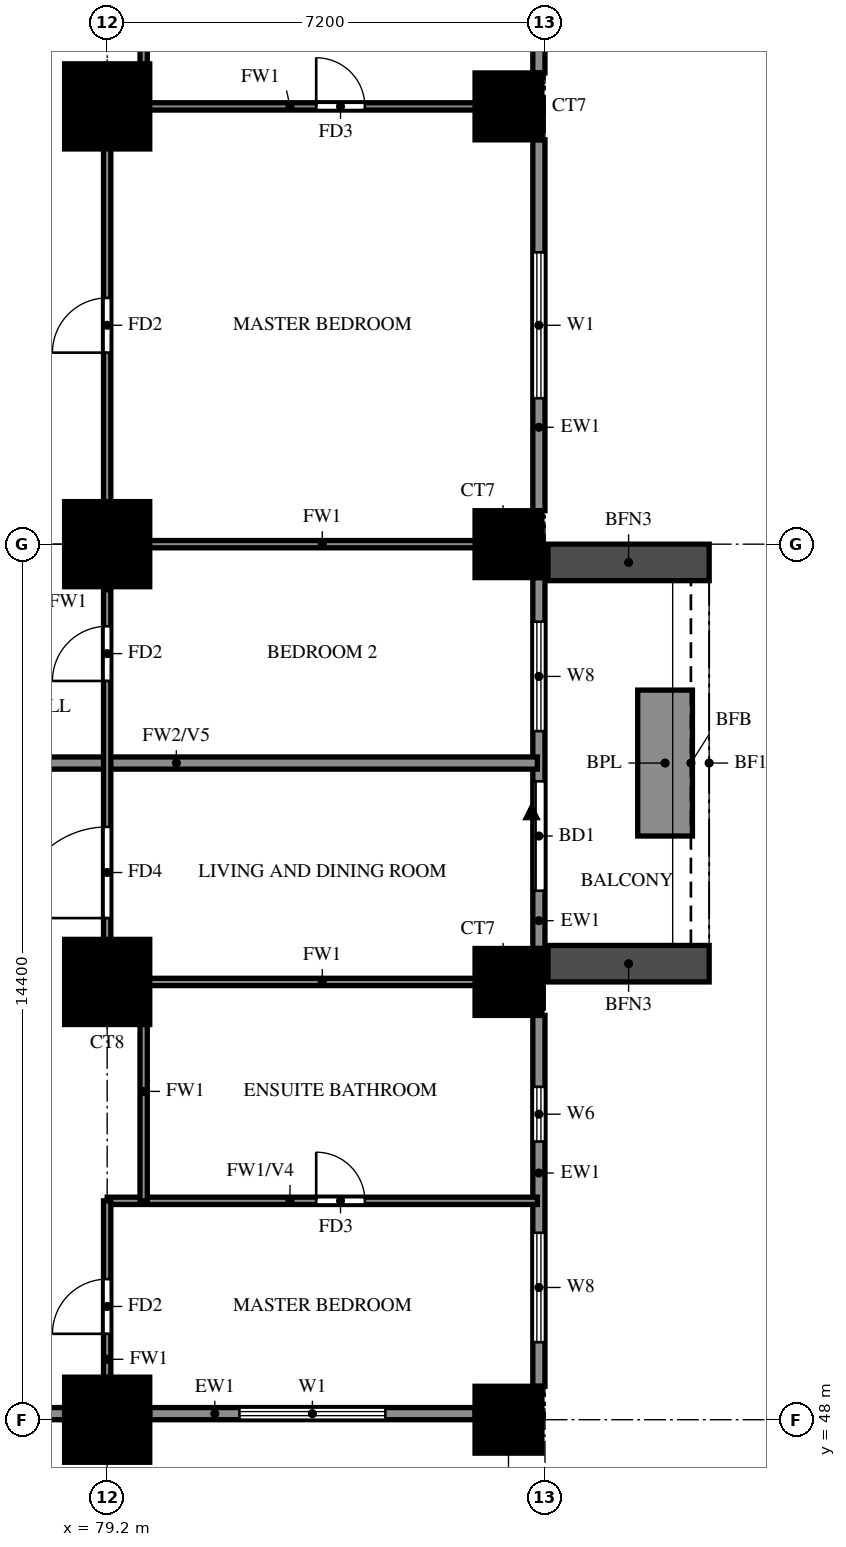
"""IFC4 building model, lengths in metres.
Left out: names, types, materials, properties, quantities, classifications, styles, units other than length and angle.
Written with IfcOpenShell. Run it as: python <this file> out.ifc"""

import sys

from ifc_helpers import new_model, si_unit, direction, frame, frame_2d, origin, origin_2d, place, context, subcontext, project, spatial, rectangle, extrude, source, transform, mapped, element, fill, save


model = new_model("IFC4")
c1 = context("Model", 3, precision=1e-05, world=origin(), true_north=direction((0.0, 1.0)))
c2 = subcontext(c1, "Body", "Model", "MODEL_VIEW")
j1 = project(units=[si_unit("LENGTHUNIT", "METRE"), si_unit("PLANEANGLEUNIT", "RADIAN")], contexts=[c1])
p1 = place(None, origin())
s1 = spatial("IfcSite", under=j1, at=p1, CompositionType="ELEMENT")
p2 = place(p1, origin())
s2 = spatial("IfcBuilding", under=s1, at=p2, CompositionType="ELEMENT")
p3 = place(p2, frame((0.0, 0.0, 51.5)))
s3 = spatial("IfcBuildingStorey", under=s2, at=p3, CompositionType="ELEMENT", Elevation=51.5)
m1 = source(origin(), c2, "Body", "SweptSolid", [
    extrude(rectangle(XDim=1.4, YDim=1.4, at=origin_2d()), origin(), (0.0, 0.0, 1.0), 3.18),
])
p4 = place(p3, frame((79.2, 48.0, 0.0), z_axis=(0.0, 0.0, 1.0), x_axis=(1.0, 0.0, 0.0)))
e1 = element("IfcColumn", 1, at=p4, inside=s3, PredefinedType="COLUMN", context=c2, shape_type="MappedRepresentation", body=[
    mapped(m1, transform((0.0, 0.0, 0.0))),
])
m2 = source(origin(), c2, "Body", "SweptSolid", [
    extrude(rectangle(XDim=1.1, YDim=1.1, at=origin_2d()), origin(), (0.0, 0.0, 1.0), 3.18),
])
p5 = place(p3, frame((85.8, 48.0, 0.0), z_axis=(0.0, 0.0, 1.0), x_axis=(1.0, 0.0, 0.0)))
e2 = element("IfcColumn", 2, at=p5, inside=s3, PredefinedType="COLUMN", context=c2, shape_type="MappedRepresentation", body=[
    mapped(m2, transform((0.0, 0.0, 0.0))),
])
p6 = place(p3, frame((79.2, 55.2, 0.0), z_axis=(0.0, 0.0, 1.0), x_axis=(1.0, 0.0, 0.0)))
e3 = element("IfcColumn", 3, at=p6, inside=s3, PredefinedType="COLUMN", context=c2, shape_type="MappedRepresentation", body=[
    mapped(m1, transform((0.0, 0.0, 0.0))),
])
p7 = place(p3, frame((85.8, 55.2, 0.0), z_axis=(0.0, 0.0, 1.0), x_axis=(1.0, 0.0, 0.0)))
e4 = element("IfcColumn", 4, at=p7, inside=s3, PredefinedType="COLUMN", context=c2, shape_type="MappedRepresentation", body=[
    mapped(m2, transform((0.0, 0.0, 0.0))),
])
p8 = place(p3, frame((79.2, 62.4, 0.0), z_axis=(0.0, 0.0, 1.0), x_axis=(1.0, 0.0, 0.0)))
e5 = element("IfcColumn", 5, at=p8, inside=s3, PredefinedType="COLUMN", context=c2, shape_type="MappedRepresentation", body=[
    mapped(m1, transform((0.0, 0.0, 0.0))),
])
p9 = place(p3, frame((85.8, 62.4, 0.0), z_axis=(0.0, 0.0, 1.0), x_axis=(1.0, 0.0, 0.0)))
e6 = element("IfcColumn", 6, at=p9, inside=s3, PredefinedType="COLUMN", context=c2, shape_type="MappedRepresentation", body=[
    mapped(m2, transform((0.0, 0.0, 0.0))),
])
p10 = place(p3, frame((79.2, 69.6, 0.0), z_axis=(0.0, 0.0, 1.0), x_axis=(1.0, 0.0, 0.0)))
e7 = element("IfcColumn", 7, at=p10, inside=s3, PredefinedType="COLUMN", context=c2, shape_type="MappedRepresentation", body=[
    mapped(m1, transform((0.0, 0.0, 0.0))),
])
p11 = place(p3, frame((85.8, 69.6, 0.0), z_axis=(0.0, 0.0, 1.0), x_axis=(1.0, 0.0, 0.0)))
e8 = element("IfcColumn", 8, at=p11, inside=s3, PredefinedType="COLUMN", context=c2, shape_type="MappedRepresentation", body=[
    mapped(m2, transform((0.0, 0.0, 0.0))),
])
p12 = place(p3, frame((78.74, 41.118, 0.0), z_axis=(0.0, 0.0, 1.0), x_axis=(-0.707106781187, 0.707106781187, 0.0)))
e9 = element("IfcWall", 9, at=p12, inside=s3, PredefinedType="SOLIDWALL", context=c2, shape_type="SweptSolid", body=[
    extrude(rectangle(XDim=9.874, YDim=0.2, at=frame_2d((4.937, 0.0))), origin(), (0.0, 0.0, 1.0), 3.18),
])
p13 = place(p12, frame((2.264, 0.0, 0.6)))
e10 = element("IfcOpeningElement", 10, at=p13, cuts=e9, PredefinedType="OPENING", context=c2, shape_type="SweptSolid", body=[
    extrude(rectangle(XDim=2.4, YDim=2.4, at=frame_2d((1.2, 1.2))), frame((0.0, 0.11, 0.0), z_axis=(0.0, -1.0, 0.0), x_axis=(1.0, 0.0, 0.0)), (0.0, 0.0, 1.0), 0.22),
])
p14 = place(p12, frame((5.836, 0.0, 0.6)))
e11 = element("IfcOpeningElement", 11, at=p14, cuts=e9, PredefinedType="OPENING", context=c2, shape_type="SweptSolid", body=[
    extrude(rectangle(XDim=2.4, YDim=2.4, at=frame_2d((1.2, 1.2))), frame((0.0, 0.11, 0.0), z_axis=(0.0, -1.0, 0.0), x_axis=(1.0, 0.0, 0.0)), (0.0, 0.0, 1.0), 0.22),
])
p15 = place(p3, frame((71.989, 48.1, 0.0), z_axis=(0.0, 0.0, 1.0), x_axis=(1.0, 0.0, 0.0)))
e12 = element("IfcWall", 12, at=p15, inside=s3, PredefinedType="SOLIDWALL", context=c2, shape_type="SweptSolid", body=[
    extrude(rectangle(XDim=6.511, YDim=0.2, at=frame_2d((3.256, 0.0))), origin(), (0.0, 0.0, 1.0), 3.18),
])
p16 = place(p15, frame((2.206, 0.0, 1.5)))
e13 = element("IfcOpeningElement", 13, at=p16, cuts=e12, PredefinedType="OPENING", context=c2, shape_type="SweptSolid", body=[
    extrude(rectangle(XDim=0.9, YDim=0.9, at=frame_2d((0.45, 0.45))), frame((0.0, 0.11, 0.0), z_axis=(0.0, -1.0, 0.0), x_axis=(1.0, 0.0, 0.0)), (0.0, 0.0, 1.0), 0.22),
])
p17 = place(p3, frame((79.9, 48.1, 0.0), z_axis=(0.0, 0.0, 1.0), x_axis=(1.0, 0.0, 0.0)))
e14 = element("IfcWall", 14, at=p17, inside=s3, PredefinedType="SOLIDWALL", context=c2, shape_type="SweptSolid", body=[
    extrude(rectangle(XDim=5.35, YDim=0.2, at=frame_2d((2.675, 0.0))), origin(), (0.0, 0.0, 1.0), 3.18),
])
p18 = place(p17, frame((1.475, 0.0, 0.6)))
e15 = element("IfcOpeningElement", 15, at=p18, cuts=e14, PredefinedType="OPENING", context=c2, shape_type="SweptSolid", body=[
    extrude(rectangle(XDim=2.4, YDim=2.4, at=frame_2d((1.2, 1.2))), frame((0.0, 0.11, 0.0), z_axis=(0.0, -1.0, 0.0), x_axis=(1.0, 0.0, 0.0)), (0.0, 0.0, 1.0), 0.22),
])
p19 = place(p3, frame((86.3, 48.55, 0.0), z_axis=(0.0, 0.0, 1.0), x_axis=(0.0, 1.0, 0.0)))
e16 = element("IfcWall", 16, at=p19, inside=s3, PredefinedType="SOLIDWALL", context=c2, shape_type="SweptSolid", body=[
    extrude(rectangle(XDim=6.1, YDim=0.2, at=frame_2d((3.05, 0.0))), origin(), (0.0, 0.0, 1.0), 3.18),
])
p20 = place(p19, frame((0.725, 0.0, 0.6)))
e17 = element("IfcOpeningElement", 17, at=p20, cuts=e16, PredefinedType="OPENING", context=c2, shape_type="SweptSolid", body=[
    extrude(rectangle(XDim=1.8, YDim=2.4, at=frame_2d((0.9, 1.2))), frame((0.0, 0.11, 0.0), z_axis=(0.0, -1.0, 0.0), x_axis=(1.0, 0.0, 0.0)), (0.0, 0.0, 1.0), 0.22),
])
p21 = place(p19, frame((4.025, 0.0, 1.5)))
e18 = element("IfcOpeningElement", 18, at=p21, cuts=e16, PredefinedType="OPENING", context=c2, shape_type="SweptSolid", body=[
    extrude(rectangle(XDim=0.9, YDim=0.9, at=frame_2d((0.45, 0.45))), frame((0.0, 0.11, 0.0), z_axis=(0.0, -1.0, 0.0), x_axis=(1.0, 0.0, 0.0)), (0.0, 0.0, 1.0), 0.22),
])
p22 = place(p3, frame((86.3, 55.75, 0.0), z_axis=(0.0, 0.0, 1.0), x_axis=(0.0, 1.0, 0.0)))
e19 = element("IfcWall", 19, at=p22, inside=s3, PredefinedType="SOLIDWALL", context=c2, shape_type="SweptSolid", body=[
    extrude(rectangle(XDim=6.1, YDim=0.2, at=frame_2d((3.05, 0.0))), origin(), (0.0, 0.0, 1.0), 3.18),
])
p23 = place(p22, frame((0.95, 0.0, 0.0)))
e20 = element("IfcOpeningElement", 20, at=p23, cuts=e19, PredefinedType="OPENING", context=c2, shape_type="SweptSolid", body=[
    extrude(rectangle(XDim=1.8, YDim=2.4, at=frame_2d((0.9, 1.2))), frame((0.0, 0.11, 0.0), z_axis=(0.0, -1.0, 0.0), x_axis=(1.0, 0.0, 0.0)), (0.0, 0.0, 1.0), 0.22),
])
p24 = place(p22, frame((3.575, 0.0, 0.6)))
e21 = element("IfcOpeningElement", 21, at=p24, cuts=e19, PredefinedType="OPENING", context=c2, shape_type="SweptSolid", body=[
    extrude(rectangle(XDim=1.8, YDim=2.4, at=frame_2d((0.9, 1.2))), frame((0.0, 0.11, 0.0), z_axis=(0.0, -1.0, 0.0), x_axis=(1.0, 0.0, 0.0)), (0.0, 0.0, 1.0), 0.22),
])
p25 = place(p3, frame((86.3, 62.95, 0.0), z_axis=(0.0, 0.0, 1.0), x_axis=(0.0, 1.0, 0.0)))
e22 = element("IfcWall", 22, at=p25, inside=s3, PredefinedType="SOLIDWALL", context=c2, shape_type="SweptSolid", body=[
    extrude(rectangle(XDim=6.1, YDim=0.2, at=frame_2d((3.05, 0.0))), origin(), (0.0, 0.0, 1.0), 3.18),
])
p26 = place(p25, frame((1.85, 0.0, 0.6)))
e23 = element("IfcOpeningElement", 23, at=p26, cuts=e22, PredefinedType="OPENING", context=c2, shape_type="SweptSolid", body=[
    extrude(rectangle(XDim=2.4, YDim=2.4, at=frame_2d((1.2, 1.2))), frame((0.0, 0.11, 0.0), z_axis=(0.0, -1.0, 0.0), x_axis=(1.0, 0.0, 0.0)), (0.0, 0.0, 1.0), 0.22),
])
p27 = place(p3, frame((86.3, 70.15, 0.0), z_axis=(0.0, 0.0, 1.0), x_axis=(0.0, 1.0, 0.0)))
e24 = element("IfcWall", 24, at=p27, inside=s3, PredefinedType="SOLIDWALL", context=c2, shape_type="SweptSolid", body=[
    extrude(rectangle(XDim=6.1, YDim=0.2, at=frame_2d((3.05, 0.0))), origin(), (0.0, 0.0, 1.0), 3.18),
])
p28 = place(p27, frame((1.175, 0.0, 1.5)))
e25 = element("IfcOpeningElement", 25, at=p28, cuts=e24, PredefinedType="OPENING", context=c2, shape_type="SweptSolid", body=[
    extrude(rectangle(XDim=0.9, YDim=0.9, at=frame_2d((0.45, 0.45))), frame((0.0, 0.11, 0.0), z_axis=(0.0, -1.0, 0.0), x_axis=(1.0, 0.0, 0.0)), (0.0, 0.0, 1.0), 0.22),
])
p29 = place(p27, frame((3.575, 0.0, 0.6)))
e26 = element("IfcOpeningElement", 26, at=p29, cuts=e24, PredefinedType="OPENING", context=c2, shape_type="SweptSolid", body=[
    extrude(rectangle(XDim=1.8, YDim=2.4, at=frame_2d((0.9, 1.2))), frame((0.0, 0.11, 0.0), z_axis=(0.0, -1.0, 0.0), x_axis=(1.0, 0.0, 0.0)), (0.0, 0.0, 1.0), 0.22),
])
for number, where, z_axis, x_axis in (
    (27, (86.45, 55.5, 0.0), (0.0, 0.0, 1.0), (1.0, 0.0, 0.0)),
    (28, (86.45, 62.1, 0.0), (0.0, 0.0, 1.0), (1.0, 0.0, 0.0)),
):
    element("IfcWall", number, at=place(p3, frame(where, z_axis=z_axis, x_axis=x_axis)), inside=s3, PredefinedType="SOLIDWALL", context=c2, shape_type="SweptSolid", body=[
        extrude(rectangle(XDim=2.65, YDim=0.6, at=frame_2d((1.325, 0.0))), origin(), (0.0, 0.0, 1.0), 2.85),
    ])
p30 = place(p3, frame((88.375, 57.6, 0.0), z_axis=(0.0, 0.0, 1.0), x_axis=(0.0, 1.0, 0.0)))
e29 = element("IfcWall", 29, at=p30, inside=s3, PredefinedType="SOLIDWALL", context=c2, shape_type="SweptSolid", body=[
    extrude(rectangle(XDim=2.4, YDim=0.9, at=frame_2d((1.2, 0.0))), origin(), (0.0, 0.0, 1.0), 0.9),
])
p31 = place(p3, frame((74.4, 58.8, 0.0), z_axis=(0.0, 0.0, 1.0), x_axis=(1.0, 0.0, 0.0)))
e30 = element("IfcWall", 30, at=p31, inside=s3, PredefinedType="SOLIDWALL", context=c2, shape_type="SweptSolid", body=[
    extrude(rectangle(XDim=11.875, YDim=0.2, at=frame_2d((5.938, 0.0))), origin(), (0.0, 0.0, 1.0), 2.28),
])
p32 = place(p3, frame((79.2, 51.6, 0.0), z_axis=(0.0, 0.0, 1.0), x_axis=(1.0, 0.0, 0.0)))
e31 = element("IfcWall", 31, at=p32, inside=s3, PredefinedType="PARTITIONING", context=c2, shape_type="SweptSolid", body=[
    extrude(rectangle(XDim=7.075, YDim=0.12, at=frame_2d((3.538, 0.0))), origin(), (0.0, 0.0, 1.0), 2.28),
])
p33 = place(p32, frame((3.438, 0.0, 0.0)))
e32 = element("IfcOpeningElement", 32, at=p33, cuts=e31, PredefinedType="OPENING", context=c2, shape_type="SweptSolid", body=[
    extrude(rectangle(XDim=0.8, YDim=2.1, at=frame_2d((0.4, 1.05))), frame((0.0, 0.07, 0.0), z_axis=(0.0, -1.0, 0.0), x_axis=(1.0, 0.0, 0.0)), (0.0, 0.0, 1.0), 0.14),
])
for number, where, z_axis, x_axis in (
    (33, (79.2, 55.2, 0.0), (0.0, 0.0, 1.0), (1.0, 0.0, 0.0)),
    (34, (79.2, 62.4, 0.0), (0.0, 0.0, 1.0), (1.0, 0.0, 0.0)),
):
    element("IfcWall", number, at=place(p3, frame(where, z_axis=z_axis, x_axis=x_axis)), inside=s3, PredefinedType="PARTITIONING", context=c2, shape_type="SweptSolid", body=[
        extrude(rectangle(XDim=7.075, YDim=0.12, at=frame_2d((3.538, 0.0))), origin(), (0.0, 0.0, 1.0), 3.18),
    ])
p34 = place(p3, frame((79.2, 69.6, 0.0), z_axis=(0.0, 0.0, 1.0), x_axis=(1.0, 0.0, 0.0)))
e35 = element("IfcWall", 35, at=p34, inside=s3, PredefinedType="PARTITIONING", context=c2, shape_type="SweptSolid", body=[
    extrude(rectangle(XDim=7.075, YDim=0.12, at=frame_2d((3.538, 0.0))), origin(), (0.0, 0.0, 1.0), 3.18),
])
p35 = place(p34, frame((3.438, 0.0, 0.0)))
e36 = element("IfcOpeningElement", 36, at=p35, cuts=e35, PredefinedType="OPENING", context=c2, shape_type="SweptSolid", body=[
    extrude(rectangle(XDim=0.8, YDim=2.1, at=frame_2d((0.4, 1.05))), frame((0.0, 0.07, 0.0), z_axis=(0.0, -1.0, 0.0), x_axis=(1.0, 0.0, 0.0)), (0.0, 0.0, 1.0), 0.14),
])
p36 = place(p3, frame((79.2, 48.125, 0.0), z_axis=(0.0, 0.0, 1.0), x_axis=(0.0, 1.0, 0.0)))
e37 = element("IfcWall", 37, at=p36, inside=s3, PredefinedType="PARTITIONING", context=c2, shape_type="SweptSolid", body=[
    extrude(rectangle(XDim=3.475, YDim=0.12, at=frame_2d((1.738, 0.0))), origin(), (0.0, 0.0, 1.0), 3.18),
])
p37 = place(p36, frame((1.288, 0.0, 0.0)))
e38 = element("IfcOpeningElement", 38, at=p37, cuts=e37, PredefinedType="OPENING", context=c2, shape_type="SweptSolid", body=[
    extrude(rectangle(XDim=0.9, YDim=2.1, at=frame_2d((0.45, 1.05))), frame((0.0, 0.07, 0.0), z_axis=(0.0, -1.0, 0.0), x_axis=(1.0, 0.0, 0.0)), (0.0, 0.0, 1.0), 0.14),
])
p38 = place(p3, frame((79.2, 55.2, 0.0), z_axis=(0.0, 0.0, 1.0), x_axis=(0.0, 1.0, 0.0)))
e39 = element("IfcWall", 39, at=p38, inside=s3, PredefinedType="PARTITIONING", context=c2, shape_type="SweptSolid", body=[
    extrude(rectangle(XDim=14.4, YDim=0.12, at=frame_2d((7.2, 0.0))), origin(), (0.0, 0.0, 1.0), 3.18),
])
p39 = place(p38, frame((1.05, 0.0, 0.0)))
e40 = element("IfcOpeningElement", 40, at=p39, cuts=e39, PredefinedType="OPENING", context=c2, shape_type="SweptSolid", body=[
    extrude(rectangle(XDim=1.5, YDim=2.1, at=frame_2d((0.75, 1.05))), frame((0.0, 0.07, 0.0), z_axis=(0.0, -1.0, 0.0), x_axis=(1.0, 0.0, 0.0)), (0.0, 0.0, 1.0), 0.14),
])
p40 = place(p38, frame((4.95, 0.0, 0.0)))
e41 = element("IfcOpeningElement", 41, at=p40, cuts=e39, PredefinedType="OPENING", context=c2, shape_type="SweptSolid", body=[
    extrude(rectangle(XDim=0.9, YDim=2.1, at=frame_2d((0.45, 1.05))), frame((0.0, 0.07, 0.0), z_axis=(0.0, -1.0, 0.0), x_axis=(1.0, 0.0, 0.0)), (0.0, 0.0, 1.0), 0.14),
])
p41 = place(p38, frame((10.35, 0.0, 0.0)))
e42 = element("IfcOpeningElement", 42, at=p41, cuts=e39, PredefinedType="OPENING", context=c2, shape_type="SweptSolid", body=[
    extrude(rectangle(XDim=0.9, YDim=2.1, at=frame_2d((0.45, 1.05))), frame((0.0, 0.07, 0.0), z_axis=(0.0, -1.0, 0.0), x_axis=(1.0, 0.0, 0.0)), (0.0, 0.0, 1.0), 0.14),
])
for number, where, z_axis, x_axis in (
    (43, (79.8, 51.6, 0.0), (0.0, 0.0, 1.0), (0.0, 1.0, 0.0)),
    (44, (79.8, 69.6, 0.0), (0.0, 0.0, 1.0), (0.0, 1.0, 0.0)),
):
    element("IfcWall", number, at=place(p3, frame(where, z_axis=z_axis, x_axis=x_axis)), inside=s3, PredefinedType="PARTITIONING", context=c2, shape_type="SweptSolid", body=[
        extrude(rectangle(XDim=3.6, YDim=0.12, at=frame_2d((1.8, 0.0))), origin(), (0.0, 0.0, 1.0), 3.18),
    ])
p42 = place(p18, origin())
e45 = element("IfcWindow", 45, at=p42, inside=s3, PartitioningType="DOUBLE_PANEL_VERTICAL", PredefinedType="WINDOW", context=c2, shape_type="SweptSolid", body=[
    extrude(rectangle(XDim=2.4, YDim=2.4, at=frame_2d((1.2, 1.2))), frame((0.0, 0.03, 0.0), z_axis=(0.0, -1.0, 0.0), x_axis=(1.0, 0.0, 0.0)), (0.0, 0.0, 1.0), 0.06),
])
fill(e15, e45)
p43 = place(p20, origin())
e46 = element("IfcWindow", 46, at=p43, inside=s3, PartitioningType="DOUBLE_PANEL_VERTICAL", PredefinedType="WINDOW", context=c2, shape_type="SweptSolid", body=[
    extrude(rectangle(XDim=1.8, YDim=2.4, at=frame_2d((0.9, 1.2))), frame((0.0, 0.03, 0.0), z_axis=(0.0, -1.0, 0.0), x_axis=(1.0, 0.0, 0.0)), (0.0, 0.0, 1.0), 0.06),
])
fill(e17, e46)
p44 = place(p21, origin())
e47 = element("IfcWindow", 47, at=p44, inside=s3, PartitioningType="SINGLE_PANEL", PredefinedType="WINDOW", context=c2, shape_type="SweptSolid", body=[
    extrude(rectangle(XDim=0.9, YDim=0.9, at=frame_2d((0.45, 0.45))), frame((0.0, 0.03, 0.0), z_axis=(0.0, -1.0, 0.0), x_axis=(1.0, 0.0, 0.0)), (0.0, 0.0, 1.0), 0.06),
])
fill(e18, e47)
p45 = place(p23, origin())
e48 = element("IfcDoor", 48, at=p45, inside=s3, OperationType="DOUBLE_DOOR_SLIDING", PredefinedType="DOOR", context=c2, shape_type="SweptSolid", body=[
    extrude(rectangle(XDim=1.8, YDim=2.4, at=frame_2d((0.9, 1.2))), frame((0.0, 0.025, 0.0), z_axis=(0.0, -1.0, 0.0), x_axis=(1.0, 0.0, 0.0)), (0.0, 0.0, 1.0), 0.05),
])
fill(e20, e48)
p46 = place(p24, origin())
e49 = element("IfcWindow", 49, at=p46, inside=s3, PartitioningType="DOUBLE_PANEL_VERTICAL", PredefinedType="WINDOW", context=c2, shape_type="SweptSolid", body=[
    extrude(rectangle(XDim=1.8, YDim=2.4, at=frame_2d((0.9, 1.2))), frame((0.0, 0.03, 0.0), z_axis=(0.0, -1.0, 0.0), x_axis=(1.0, 0.0, 0.0)), (0.0, 0.0, 1.0), 0.06),
])
fill(e21, e49)
p47 = place(p26, origin())
e50 = element("IfcWindow", 50, at=p47, inside=s3, PartitioningType="DOUBLE_PANEL_VERTICAL", PredefinedType="WINDOW", context=c2, shape_type="SweptSolid", body=[
    extrude(rectangle(XDim=2.4, YDim=2.4, at=frame_2d((1.2, 1.2))), frame((0.0, 0.03, 0.0), z_axis=(0.0, -1.0, 0.0), x_axis=(1.0, 0.0, 0.0)), (0.0, 0.0, 1.0), 0.06),
])
fill(e23, e50)
p48 = place(p37, origin())
e51 = element("IfcDoor", 51, at=p48, inside=s3, OperationType="SINGLE_SWING_RIGHT", PredefinedType="DOOR", context=c2, shape_type="SweptSolid", body=[
    extrude(rectangle(XDim=0.9, YDim=2.1, at=frame_2d((0.45, 1.05))), frame((0.0, 0.025, 0.0), z_axis=(0.0, -1.0, 0.0), x_axis=(1.0, 0.0, 0.0)), (0.0, 0.0, 1.0), 0.05),
])
fill(e38, e51)
p49 = place(p33, origin())
e52 = element("IfcDoor", 52, at=p49, inside=s3, OperationType="SINGLE_SWING_LEFT", PredefinedType="DOOR", context=c2, shape_type="SweptSolid", body=[
    extrude(rectangle(XDim=0.8, YDim=2.1, at=frame_2d((0.4, 1.05))), frame((0.0, 0.025, 0.0), z_axis=(0.0, -1.0, 0.0), x_axis=(1.0, 0.0, 0.0)), (0.0, 0.0, 1.0), 0.05),
])
fill(e32, e52)
p50 = place(p39, origin())
e53 = element("IfcDoor", 53, at=p50, inside=s3, OperationType="SINGLE_SWING_LEFT", PredefinedType="DOOR", context=c2, shape_type="SweptSolid", body=[
    extrude(rectangle(XDim=1.5, YDim=2.1, at=frame_2d((0.75, 1.05))), frame((0.0, 0.025, 0.0), z_axis=(0.0, -1.0, 0.0), x_axis=(1.0, 0.0, 0.0)), (0.0, 0.0, 1.0), 0.05),
])
fill(e40, e53)
p51 = place(p40, origin())
e54 = element("IfcDoor", 54, at=p51, inside=s3, OperationType="SINGLE_SWING_RIGHT", PredefinedType="DOOR", context=c2, shape_type="SweptSolid", body=[
    extrude(rectangle(XDim=0.9, YDim=2.1, at=frame_2d((0.45, 1.05))), frame((0.0, 0.025, 0.0), z_axis=(0.0, -1.0, 0.0), x_axis=(1.0, 0.0, 0.0)), (0.0, 0.0, 1.0), 0.05),
])
fill(e41, e54)
p52 = place(p41, origin())
e55 = element("IfcDoor", 55, at=p52, inside=s3, OperationType="SINGLE_SWING_LEFT", PredefinedType="DOOR", context=c2, shape_type="SweptSolid", body=[
    extrude(rectangle(XDim=0.9, YDim=2.1, at=frame_2d((0.45, 1.05))), frame((0.0, 0.025, 0.0), z_axis=(0.0, -1.0, 0.0), x_axis=(1.0, 0.0, 0.0)), (0.0, 0.0, 1.0), 0.05),
])
fill(e42, e55)
p53 = place(p35, origin())
e56 = element("IfcDoor", 56, at=p53, inside=s3, OperationType="SINGLE_SWING_LEFT", PredefinedType="DOOR", context=c2, shape_type="SweptSolid", body=[
    extrude(rectangle(XDim=0.8, YDim=2.1, at=frame_2d((0.4, 1.05))), frame((0.0, 0.025, 0.0), z_axis=(0.0, -1.0, 0.0), x_axis=(1.0, 0.0, 0.0)), (0.0, 0.0, 1.0), 0.05),
])
fill(e36, e56)
save(model, sys.argv[1])
